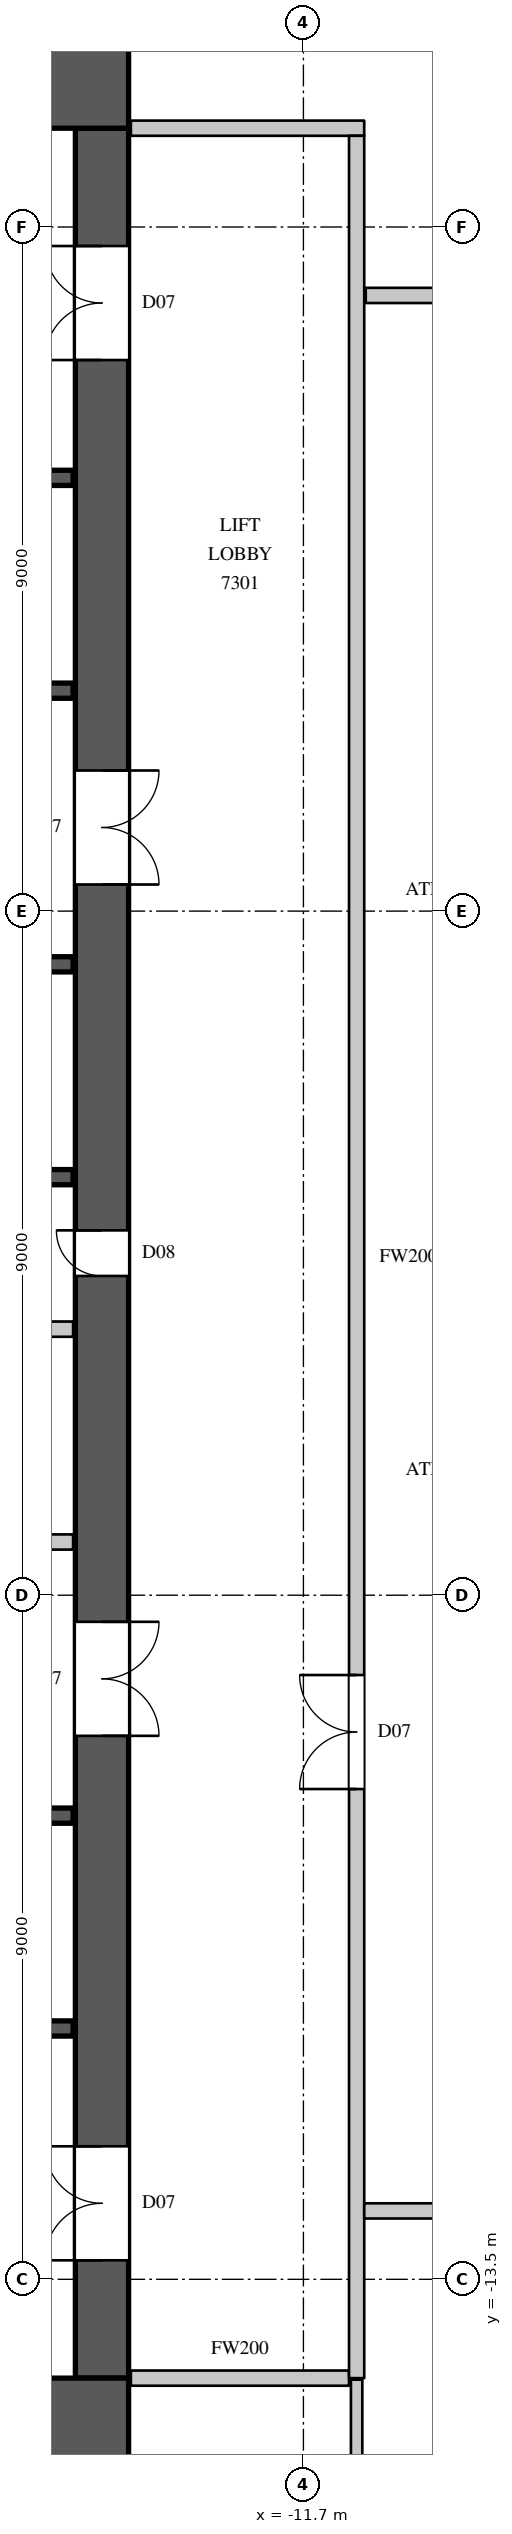
"""IFC4 building model, lengths in metres.
Left out: names, types, materials, properties, quantities, classifications, styles, units other than length and angle.
Written with IfcOpenShell. Run it as: python <this file> out.ifc"""

import sys

from ifc_helpers import new_model, si_unit, direction, frame, frame_2d, origin, place, context, subcontext, project, spatial, rectangle, extrude, element, fill, save


model = new_model("IFC4")
c1 = context("Model", 3, precision=1e-05, world=origin(), true_north=direction((0.0, 1.0)))
c2 = subcontext(c1, "Body", "Model", "MODEL_VIEW")
j1 = project(units=[si_unit("LENGTHUNIT", "METRE"), si_unit("PLANEANGLEUNIT", "RADIAN")], contexts=[c1])
p1 = place(None, origin())
s1 = spatial("IfcSite", under=j1, at=p1, CompositionType="ELEMENT")
p2 = place(p1, origin())
s2 = spatial("IfcBuilding", under=s1, at=p2, CompositionType="ELEMENT")
p3 = place(p2, frame((0.0, 0.0, 321.3)))
s3 = spatial("IfcBuildingStorey", under=s2, at=p3, CompositionType="ELEMENT", Elevation=321.3)
for number, where, z_axis, x_axis in (
    (1, (-30.0, 15.4, 0.0), (0.0, 0.0, 1.0), (1.0, 0.0, 0.0)),
    (2, (-30.0, -15.4, 0.0), (0.0, 0.0, 1.0), (1.0, 0.0, 0.0)),
):
    element("IfcWall", number, at=place(p3, frame(where, z_axis=z_axis, x_axis=x_axis)), inside=s3, PredefinedType="SHEAR", context=c2, shape_type="SweptSolid", body=[
        extrude(rectangle(XDim=16.0, YDim=1.2, at=frame_2d((8.0, 0.0))), origin(), (0.0, 0.0, 1.0), 4.1),
    ])
p4 = place(p3, frame((-14.35, -14.8, 0.0), z_axis=(0.0, 0.0, 1.0), x_axis=(0.0, 1.0, 0.0)))
e3 = element("IfcWall", 3, at=p4, inside=s3, PredefinedType="SHEAR", context=c2, shape_type="SweptSolid", body=[
    extrude(rectangle(XDim=29.6, YDim=0.7, at=frame_2d((14.8, 0.0))), origin(), (0.0, 0.0, 1.0), 4.1),
])
p5 = place(p4, frame((1.55, 0.0, 0.0)))
e4 = element("IfcOpeningElement", 4, at=p5, cuts=e3, PredefinedType="OPENING", context=c2, shape_type="SweptSolid", body=[
    extrude(rectangle(XDim=1.5, YDim=2.4, at=frame_2d((0.75, 1.2))), frame((0.0, 0.36, 0.0), z_axis=(0.0, -1.0, 0.0), x_axis=(1.0, 0.0, 0.0)), (0.0, 0.0, 1.0), 0.72),
])
p6 = place(p4, frame((26.55, 0.0, 0.0)))
e5 = element("IfcOpeningElement", 5, at=p6, cuts=e3, PredefinedType="OPENING", context=c2, shape_type="SweptSolid", body=[
    extrude(rectangle(XDim=1.5, YDim=2.4, at=frame_2d((0.75, 1.2))), frame((0.0, 0.36, 0.0), z_axis=(0.0, -1.0, 0.0), x_axis=(1.0, 0.0, 0.0)), (0.0, 0.0, 1.0), 0.72),
])
p7 = place(p4, frame((8.45, 0.0, 0.0)))
e6 = element("IfcOpeningElement", 6, at=p7, cuts=e3, PredefinedType="OPENING", context=c2, shape_type="SweptSolid", body=[
    extrude(rectangle(XDim=1.5, YDim=2.4, at=frame_2d((0.75, 1.2))), frame((0.0, 0.36, 0.0), z_axis=(0.0, -1.0, 0.0), x_axis=(1.0, 0.0, 0.0)), (0.0, 0.0, 1.0), 0.72),
])
p8 = place(p4, frame((19.65, 0.0, 0.0)))
e7 = element("IfcOpeningElement", 7, at=p8, cuts=e3, PredefinedType="OPENING", context=c2, shape_type="SweptSolid", body=[
    extrude(rectangle(XDim=1.5, YDim=2.4, at=frame_2d((0.75, 1.2))), frame((0.0, 0.36, 0.0), z_axis=(0.0, -1.0, 0.0), x_axis=(1.0, 0.0, 0.0)), (0.0, 0.0, 1.0), 0.72),
])
p9 = place(p4, frame((14.5, 0.0, 0.0)))
e8 = element("IfcOpeningElement", 8, at=p9, cuts=e3, PredefinedType="OPENING", context=c2, shape_type="SweptSolid", body=[
    extrude(rectangle(XDim=0.6, YDim=2.0, at=frame_2d((0.3, 1.0))), frame((0.0, 0.36, 0.0), z_axis=(0.0, -1.0, 0.0), x_axis=(1.0, 0.0, 0.0)), (0.0, 0.0, 1.0), 0.72),
])
p10 = place(p3, frame((-17.78, -3.8, 0.0), z_axis=(0.0, 0.0, 1.0), x_axis=(1.0, 0.0, 0.0)))
e9 = element("IfcWall", 9, at=p10, inside=s3, PredefinedType="PARTITIONING", context=c2, shape_type="SweptSolid", body=[
    extrude(rectangle(XDim=3.05, YDim=0.2, at=frame_2d((1.525, 0.0))), origin(), (0.0, 0.0, 1.0), 3.8),
])
p11 = place(p10, frame((1.05, 0.0, 0.0)))
e10 = element("IfcOpeningElement", 10, at=p11, cuts=e9, PredefinedType="OPENING", context=c2, shape_type="SweptSolid", body=[
    extrude(rectangle(XDim=0.9, YDim=2.2, at=frame_2d((0.45, 1.1))), frame((0.0, 0.11, 0.0), z_axis=(0.0, -1.0, 0.0), x_axis=(1.0, 0.0, 0.0)), (0.0, 0.0, 1.0), 0.22),
])
p12 = place(p3, frame((-13.97, -14.8, 0.0), z_axis=(0.0, 0.0, 1.0), x_axis=(1.0, 0.0, 0.0)))
e11 = element("IfcWall", 11, at=p12, inside=s3, PredefinedType="PARTITIONING", context=c2, shape_type="SweptSolid", body=[
    extrude(rectangle(XDim=2.87, YDim=0.2, at=frame_2d((1.435, 0.0))), origin(), (0.0, 0.0, 1.0), 3.8),
])
p13 = place(p3, frame((-13.97, 14.8, 0.0), z_axis=(0.0, 0.0, 1.0), x_axis=(1.0, 0.0, 0.0)))
e12 = element("IfcWall", 12, at=p13, inside=s3, PredefinedType="PARTITIONING", context=c2, shape_type="SweptSolid", body=[
    extrude(rectangle(XDim=3.07, YDim=0.2, at=frame_2d((1.535, 0.0))), origin(), (0.0, 0.0, 1.0), 3.8),
])
p14 = place(p3, frame((-11.0, -14.8, 0.0), z_axis=(0.0, 0.0, 1.0), x_axis=(0.0, 1.0, 0.0)))
e13 = element("IfcWall", 13, at=p14, inside=s3, PredefinedType="PARTITIONING", context=c2, shape_type="SweptSolid", body=[
    extrude(rectangle(XDim=29.5, YDim=0.2, at=frame_2d((14.75, 0.0))), origin(), (0.0, 0.0, 1.0), 3.8),
])
p15 = place(p14, frame((7.75, 0.0, 0.0)))
e14 = element("IfcOpeningElement", 14, at=p15, cuts=e13, PredefinedType="OPENING", context=c2, shape_type="SweptSolid", body=[
    extrude(rectangle(XDim=1.5, YDim=2.4, at=frame_2d((0.75, 1.2))), frame((0.0, 0.11, 0.0), z_axis=(0.0, -1.0, 0.0), x_axis=(1.0, 0.0, 0.0)), (0.0, 0.0, 1.0), 0.22),
])
p16 = place(p3, frame((-10.9, -12.6, 0.0), z_axis=(0.0, 0.0, 1.0), x_axis=(1.0, 0.0, 0.0)))
e15 = element("IfcWall", 15, at=p16, inside=s3, PredefinedType="PARTITIONING", context=c2, shape_type="SweptSolid", body=[
    extrude(rectangle(XDim=22.6, YDim=0.2, at=frame_2d((11.3, 0.0))), origin(), (0.0, 0.0, 1.0), 3.8),
])
p17 = place(p16, frame((14.1, 0.0, 0.0)))
e16 = element("IfcOpeningElement", 16, at=p17, cuts=e15, PredefinedType="OPENING", context=c2, shape_type="SweptSolid", body=[
    extrude(rectangle(XDim=0.9, YDim=2.2, at=frame_2d((0.45, 1.1))), frame((0.0, 0.11, 0.0), z_axis=(0.0, -1.0, 0.0), x_axis=(1.0, 0.0, 0.0)), (0.0, 0.0, 1.0), 0.22),
])
p18 = place(p16, frame((17.4, 0.0, 0.0)))
e17 = element("IfcOpeningElement", 17, at=p18, cuts=e15, PredefinedType="OPENING", context=c2, shape_type="SweptSolid", body=[
    extrude(rectangle(XDim=0.9, YDim=2.2, at=frame_2d((0.45, 1.1))), frame((0.0, 0.11, 0.0), z_axis=(0.0, -1.0, 0.0), x_axis=(1.0, 0.0, 0.0)), (0.0, 0.0, 1.0), 0.22),
])
p19 = place(p16, frame((20.25, 0.0, 0.0)))
e18 = element("IfcOpeningElement", 18, at=p19, cuts=e15, PredefinedType="OPENING", context=c2, shape_type="SweptSolid", body=[
    extrude(rectangle(XDim=0.9, YDim=2.2, at=frame_2d((0.45, 1.1))), frame((0.0, 0.11, 0.0), z_axis=(0.0, -1.0, 0.0), x_axis=(1.0, 0.0, 0.0)), (0.0, 0.0, 1.0), 0.22),
])
p20 = place(p16, frame((1.95, 0.0, 0.0)))
e19 = element("IfcOpeningElement", 19, at=p20, cuts=e15, PredefinedType="OPENING", context=c2, shape_type="SweptSolid", body=[
    extrude(rectangle(XDim=1.1, YDim=2.4, at=frame_2d((0.55, 1.2))), frame((0.0, 0.11, 0.0), z_axis=(0.0, -1.0, 0.0), x_axis=(1.0, 0.0, 0.0)), (0.0, 0.0, 1.0), 0.22),
])
p21 = place(p16, frame((9.95, 0.0, 0.0)))
e20 = element("IfcOpeningElement", 20, at=p21, cuts=e15, PredefinedType="OPENING", context=c2, shape_type="SweptSolid", body=[
    extrude(rectangle(XDim=1.1, YDim=2.4, at=frame_2d((0.55, 1.2))), frame((0.0, 0.11, 0.0), z_axis=(0.0, -1.0, 0.0), x_axis=(1.0, 0.0, 0.0)), (0.0, 0.0, 1.0), 0.22),
])
p22 = place(p3, frame((-10.88, 12.6, 0.0), z_axis=(0.0, 0.0, 1.0), x_axis=(1.0, 0.0, 0.0)))
e21 = element("IfcWall", 21, at=p22, inside=s3, PredefinedType="PARTITIONING", context=c2, shape_type="SweptSolid", body=[
    extrude(rectangle(XDim=4.08, YDim=0.2, at=frame_2d((2.04, 0.0))), origin(), (0.0, 0.0, 1.0), 3.8),
])
p23 = place(p3, frame((-11.0, -23.757, 0.0), z_axis=(0.0, 0.0, 1.0), x_axis=(0.0, 1.0, 0.0)))
e22 = element("IfcWall", 22, at=p23, inside=s3, PredefinedType="PARTITIONING", context=c2, shape_type="SweptSolid", body=[
    extrude(rectangle(XDim=8.937, YDim=0.15, at=frame_2d((4.468, 0.0))), origin(), (0.0, 0.0, 1.0), 3.8),
])
p24 = place(p3, frame((-29.27, -1.0, 0.0), z_axis=(0.0, 0.0, 1.0), x_axis=(1.0, 0.0, 0.0)))
e23 = element("IfcWall", 23, at=p24, inside=s3, PredefinedType="PARTITIONING", context=c2, shape_type="SweptSolid", body=[
    extrude(rectangle(XDim=14.54, YDim=0.2, at=frame_2d((7.27, 0.0))), origin(), (0.0, 0.0, 1.0), 3.8),
])
p25 = place(p3, frame((-17.92, -10.2, 0.0), z_axis=(0.0, 0.0, 1.0), x_axis=(1.0, 0.0, 0.0)))
e24 = element("IfcWall", 24, at=p25, inside=s3, PredefinedType="SHEAR", context=c2, shape_type="SweptSolid", body=[
    extrude(rectangle(XDim=3.19, YDim=0.2, at=frame_2d((1.595, 0.0))), origin(), (0.0, 0.0, 1.0), 3.8),
])
p26 = place(p25, frame((1.05, 0.0, 0.0)))
e25 = element("IfcOpeningElement", 25, at=p26, cuts=e24, PredefinedType="OPENING", context=c2, shape_type="SweptSolid", body=[
    extrude(rectangle(XDim=1.1, YDim=2.2, at=frame_2d((0.55, 1.1))), frame((0.0, 0.11, 0.0), z_axis=(0.0, -1.0, 0.0), x_axis=(1.0, 0.0, 0.0)), (0.0, 0.0, 1.0), 0.22),
])
for number, where, z_axis, x_axis in (
    (26, (-17.9, -7.4, 0.0), (0.0, 0.0, 1.0), (1.0, 0.0, 0.0)),
    (27, (-17.9, 1.0, 0.0), (0.0, 0.0, 1.0), (1.0, 0.0, 0.0)),
):
    element("IfcWall", number, at=place(p3, frame(where, z_axis=z_axis, x_axis=x_axis)), inside=s3, PredefinedType="SHEAR", context=c2, shape_type="SweptSolid", body=[
        extrude(rectangle(XDim=3.17, YDim=0.2, at=frame_2d((1.585, 0.0))), origin(), (0.0, 0.0, 1.0), 3.8),
    ])
p27 = place(p3, frame((-17.9, 3.8, 0.0), z_axis=(0.0, 0.0, 1.0), x_axis=(1.0, 0.0, 0.0)))
e28 = element("IfcWall", 28, at=p27, inside=s3, PredefinedType="SHEAR", context=c2, shape_type="SweptSolid", body=[
    extrude(rectangle(XDim=3.17, YDim=0.2, at=frame_2d((1.585, 0.0))), origin(), (0.0, 0.0, 1.0), 3.8),
])
p28 = place(p27, frame((1.05, 0.0, 0.0)))
e29 = element("IfcOpeningElement", 29, at=p28, cuts=e28, PredefinedType="OPENING", context=c2, shape_type="SweptSolid", body=[
    extrude(rectangle(XDim=1.1, YDim=2.2, at=frame_2d((0.55, 1.1))), frame((0.0, 0.11, 0.0), z_axis=(0.0, -1.0, 0.0), x_axis=(1.0, 0.0, 0.0)), (0.0, 0.0, 1.0), 0.22),
])
p29 = place(p3, frame((-17.92, 7.4, 0.0), z_axis=(0.0, 0.0, 1.0), x_axis=(1.0, 0.0, 0.0)))
e30 = element("IfcWall", 30, at=p29, inside=s3, PredefinedType="SHEAR", context=c2, shape_type="SweptSolid", body=[
    extrude(rectangle(XDim=3.19, YDim=0.2, at=frame_2d((1.595, 0.0))), origin(), (0.0, 0.0, 1.0), 3.8),
])
p30 = place(p3, frame((-17.92, 10.2, 0.0), z_axis=(0.0, 0.0, 1.0), x_axis=(1.0, 0.0, 0.0)))
e31 = element("IfcWall", 31, at=p30, inside=s3, PredefinedType="SHEAR", context=c2, shape_type="SweptSolid", body=[
    extrude(rectangle(XDim=3.19, YDim=0.2, at=frame_2d((1.595, 0.0))), origin(), (0.0, 0.0, 1.0), 3.8),
])
p31 = place(p30, frame((1.05, 0.0, 0.0)))
e32 = element("IfcOpeningElement", 32, at=p31, cuts=e31, PredefinedType="OPENING", context=c2, shape_type="SweptSolid", body=[
    extrude(rectangle(XDim=1.1, YDim=2.2, at=frame_2d((0.55, 1.1))), frame((0.0, 0.11, 0.0), z_axis=(0.0, -1.0, 0.0), x_axis=(1.0, 0.0, 0.0)), (0.0, 0.0, 1.0), 0.22),
])
p32 = place(p15, origin())
e33 = element("IfcDoor", 33, at=p32, inside=s3, OperationType="DOUBLE_DOOR_SINGLE_SWING", PredefinedType="DOOR", context=c2, shape_type="SweptSolid", body=[
    extrude(rectangle(XDim=1.5, YDim=2.4, at=frame_2d((0.75, 1.2))), frame((0.0, 0.025, 0.0), z_axis=(0.0, -1.0, 0.0), x_axis=(1.0, 0.0, 0.0)), (0.0, 0.0, 1.0), 0.05),
])
fill(e14, e33)
p33 = place(p5, origin())
e34 = element("IfcDoor", 34, at=p33, inside=s3, OperationType="DOUBLE_DOOR_SINGLE_SWING", PredefinedType="DOOR", context=c2, shape_type="SweptSolid", body=[
    extrude(rectangle(XDim=1.5, YDim=2.4, at=frame_2d((0.75, 1.2))), frame((0.0, 0.345, 0.0), z_axis=(0.0, -1.0, 0.0), x_axis=(1.0, 0.0, 0.0)), (0.0, 0.0, 1.0), 0.05),
])
fill(e4, e34)
p34 = place(p6, origin())
e35 = element("IfcDoor", 35, at=p34, inside=s3, OperationType="DOUBLE_DOOR_SINGLE_SWING", PredefinedType="DOOR", context=c2, shape_type="SweptSolid", body=[
    extrude(rectangle(XDim=1.5, YDim=2.4, at=frame_2d((0.75, 1.2))), frame((0.0, 0.345, 0.0), z_axis=(0.0, -1.0, 0.0), x_axis=(1.0, 0.0, 0.0)), (0.0, 0.0, 1.0), 0.05),
])
fill(e5, e35)
p35 = place(p7, origin())
e36 = element("IfcDoor", 36, at=p35, inside=s3, OperationType="DOUBLE_DOOR_SINGLE_SWING", PredefinedType="DOOR", context=c2, shape_type="SweptSolid", body=[
    extrude(rectangle(XDim=1.5, YDim=2.4, at=frame_2d((0.75, 1.2))), frame((0.0, -0.295, 0.0), z_axis=(0.0, -1.0, 0.0), x_axis=(1.0, 0.0, 0.0)), (0.0, 0.0, 1.0), 0.05),
])
fill(e6, e36)
p36 = place(p8, origin())
e37 = element("IfcDoor", 37, at=p36, inside=s3, OperationType="DOUBLE_DOOR_SINGLE_SWING", PredefinedType="DOOR", context=c2, shape_type="SweptSolid", body=[
    extrude(rectangle(XDim=1.5, YDim=2.4, at=frame_2d((0.75, 1.2))), frame((0.0, -0.295, 0.0), z_axis=(0.0, -1.0, 0.0), x_axis=(1.0, 0.0, 0.0)), (0.0, 0.0, 1.0), 0.05),
])
fill(e7, e37)
p37 = place(p9, origin())
e38 = element("IfcDoor", 38, at=p37, inside=s3, OperationType="SINGLE_SWING_RIGHT", PredefinedType="DOOR", context=c2, shape_type="SweptSolid", body=[
    extrude(rectangle(XDim=0.6, YDim=2.0, at=frame_2d((0.3, 1.0))), frame((0.0, 0.345, 0.0), z_axis=(0.0, -1.0, 0.0), x_axis=(1.0, 0.0, 0.0)), (0.0, 0.0, 1.0), 0.05),
])
fill(e8, e38)
save(model, sys.argv[1])
